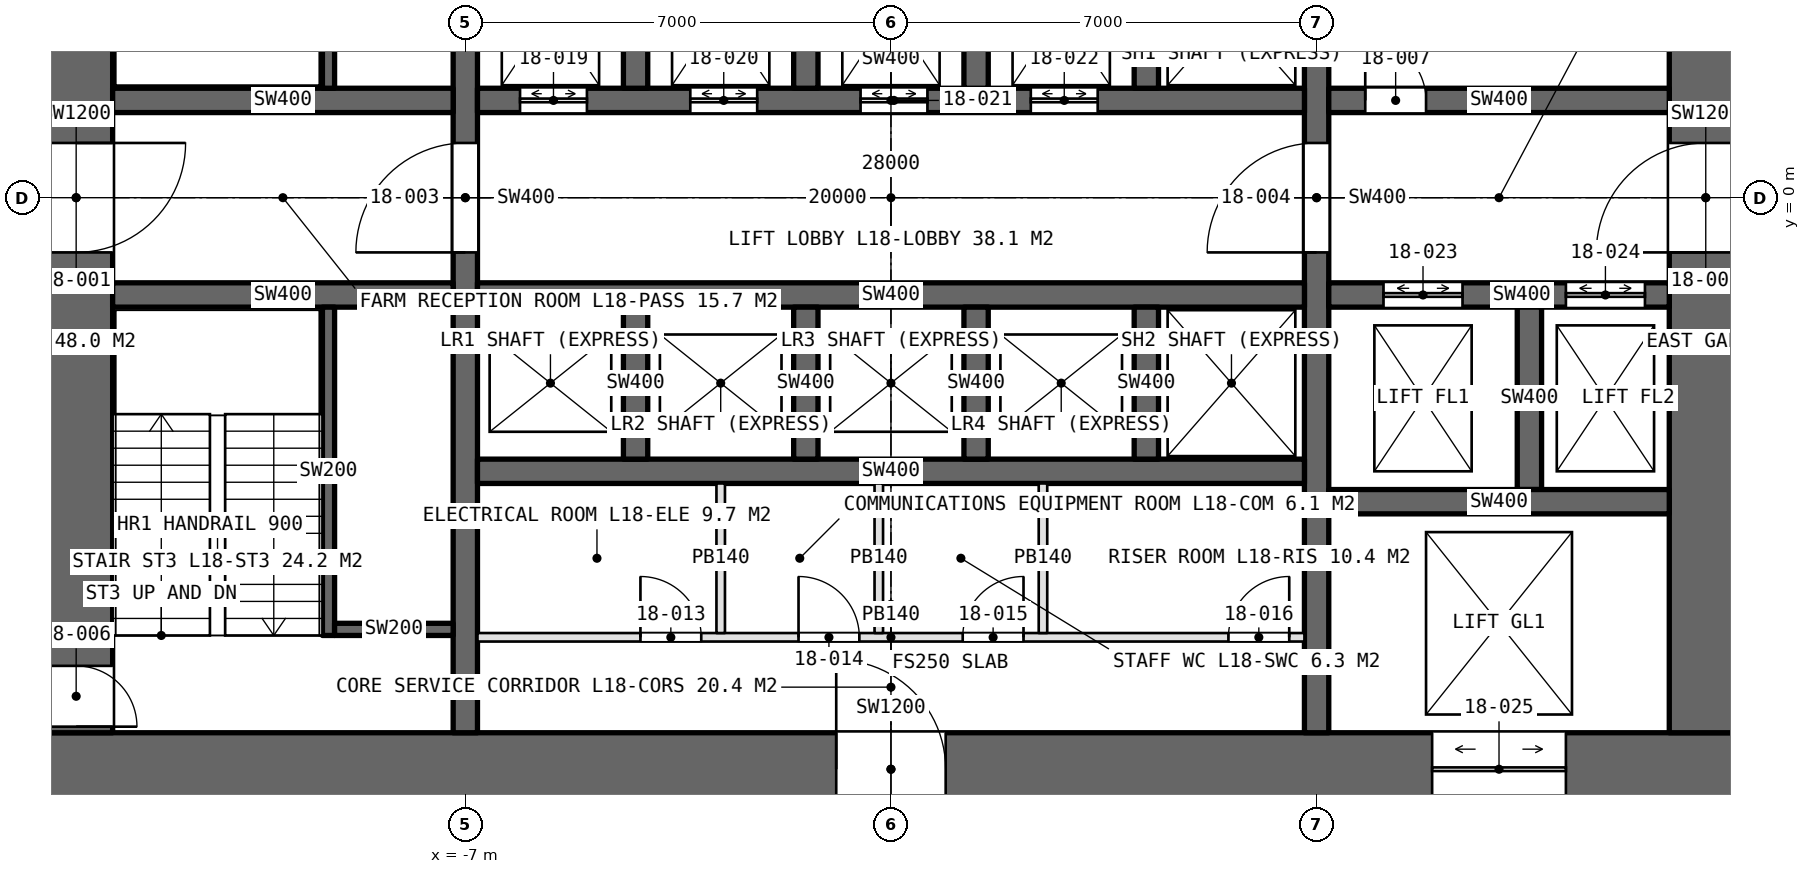
"""IFC4 building model, lengths in metres.
Left out: names, types, materials, properties, quantities, classifications, styles, units other than length and angle.
Written with IfcOpenShell. Run it as: python <this file> out.ifc"""

import sys

from ifc_helpers import new_model, si_unit, direction, frame, frame_2d, origin, place, context, subcontext, project, spatial, rectangle, extrude, element, fill, save


model = new_model("IFC4")
c1 = context("Model", 3, precision=1e-05, world=origin(), true_north=direction((0.0, 1.0)))
c2 = subcontext(c1, "Body", "Model", "MODEL_VIEW")
j1 = project(units=[si_unit("LENGTHUNIT", "METRE"), si_unit("PLANEANGLEUNIT", "RADIAN")], contexts=[c1])
p1 = place(None, origin())
s1 = spatial("IfcSite", under=j1, at=p1, CompositionType="ELEMENT")
p2 = place(p1, origin())
s2 = spatial("IfcBuilding", under=s1, at=p2, CompositionType="ELEMENT")
p3 = place(p2, frame((0.0, 0.0, 90.0)))
s3 = spatial("IfcBuildingStorey", under=s2, at=p3, CompositionType="ELEMENT", Elevation=90.0)
p4 = place(p3, frame((-14.0, -9.4, 0.0), z_axis=(0.0, 0.0, 1.0), x_axis=(1.0, 0.0, 0.0)))
e1 = element("IfcWall", 1, at=p4, inside=s3, PredefinedType="SHEAR", context=c2, shape_type="SweptSolid", body=[
    extrude(rectangle(XDim=28.0, YDim=1.2, at=frame_2d((14.0, 0.0))), origin(), (0.0, 0.0, 1.0), 5.0),
])
p5 = place(p4, frame((13.1, 0.0, 0.0)))
e2 = element("IfcOpeningElement", 2, at=p5, cuts=e1, PredefinedType="OPENING", context=c2, shape_type="SweptSolid", body=[
    extrude(rectangle(XDim=1.8, YDim=2.4, at=frame_2d((0.9, 1.2))), frame((0.0, 0.61, 0.0), z_axis=(0.0, -1.0, 0.0), x_axis=(1.0, 0.0, 0.0)), (0.0, 0.0, 1.0), 1.22),
])
p6 = place(p4, frame((22.9, 0.0, 0.0)))
e3 = element("IfcOpeningElement", 3, at=p6, cuts=e1, PredefinedType="OPENING", context=c2, shape_type="SweptSolid", body=[
    extrude(rectangle(XDim=2.2, YDim=2.7, at=frame_2d((1.1, 1.35))), frame((0.0, 0.61, 0.0), z_axis=(0.0, -1.0, 0.0), x_axis=(1.0, 0.0, 0.0)), (0.0, 0.0, 1.0), 1.22),
])
p7 = place(p3, frame((-13.4, 8.8, 0.0), z_axis=(0.0, 0.0, 1.0), x_axis=(0.0, -1.0, 0.0)))
e4 = element("IfcWall", 4, at=p7, inside=s3, PredefinedType="SHEAR", context=c2, shape_type="SweptSolid", body=[
    extrude(rectangle(XDim=17.6, YDim=1.2, at=frame_2d((8.8, 0.0))), origin(), (0.0, 0.0, 1.0), 5.0),
])
p8 = place(p7, frame((7.9, 0.0, 0.0)))
e5 = element("IfcOpeningElement", 5, at=p8, cuts=e4, PredefinedType="OPENING", context=c2, shape_type="SweptSolid", body=[
    extrude(rectangle(XDim=1.8, YDim=2.4, at=frame_2d((0.9, 1.2))), frame((0.0, 0.61, 0.0), z_axis=(0.0, -1.0, 0.0), x_axis=(1.0, 0.0, 0.0)), (0.0, 0.0, 1.0), 1.22),
])
p9 = place(p7, frame((16.5, 0.0, 0.0)))
e6 = element("IfcOpeningElement", 6, at=p9, cuts=e4, PredefinedType="OPENING", context=c2, shape_type="SweptSolid", body=[
    extrude(rectangle(XDim=1.0, YDim=2.4, at=frame_2d((0.5, 1.2))), frame((0.0, 0.61, 0.0), z_axis=(0.0, -1.0, 0.0), x_axis=(1.0, 0.0, 0.0)), (0.0, 0.0, 1.0), 1.22),
])
p10 = place(p3, frame((13.4, -8.8, 0.0), z_axis=(0.0, 0.0, 1.0), x_axis=(0.0, 1.0, 0.0)))
e7 = element("IfcWall", 7, at=p10, inside=s3, PredefinedType="SHEAR", context=c2, shape_type="SweptSolid", body=[
    extrude(rectangle(XDim=17.6, YDim=1.2, at=frame_2d((8.8, 0.0))), origin(), (0.0, 0.0, 1.0), 5.0),
])
p11 = place(p10, frame((7.9, 0.0, 0.0)))
e8 = element("IfcOpeningElement", 8, at=p11, cuts=e7, PredefinedType="OPENING", context=c2, shape_type="SweptSolid", body=[
    extrude(rectangle(XDim=1.8, YDim=2.4, at=frame_2d((0.9, 1.2))), frame((0.0, 0.61, 0.0), z_axis=(0.0, -1.0, 0.0), x_axis=(1.0, 0.0, 0.0)), (0.0, 0.0, 1.0), 1.22),
])
p12 = place(p3, frame((-7.0, -8.8, 0.0), z_axis=(0.0, 0.0, 1.0), x_axis=(0.0, 1.0, 0.0)))
e9 = element("IfcWall", 9, at=p12, inside=s3, PredefinedType="SHEAR", context=c2, shape_type="SweptSolid", body=[
    extrude(rectangle(XDim=17.6, YDim=0.4, at=frame_2d((8.8, 0.0))), origin(), (0.0, 0.0, 1.0), 5.0),
])
p13 = place(p12, frame((7.9, 0.0, 0.0)))
e10 = element("IfcOpeningElement", 10, at=p13, cuts=e9, PredefinedType="OPENING", context=c2, shape_type="SweptSolid", body=[
    extrude(rectangle(XDim=1.8, YDim=2.4, at=frame_2d((0.9, 1.2))), frame((0.0, 0.21, 0.0), z_axis=(0.0, -1.0, 0.0), x_axis=(1.0, 0.0, 0.0)), (0.0, 0.0, 1.0), 0.42),
])
p14 = place(p3, frame((7.0, -8.8, 0.0), z_axis=(0.0, 0.0, 1.0), x_axis=(0.0, 1.0, 0.0)))
e11 = element("IfcWall", 11, at=p14, inside=s3, PredefinedType="SHEAR", context=c2, shape_type="SweptSolid", body=[
    extrude(rectangle(XDim=17.6, YDim=0.4, at=frame_2d((8.8, 0.0))), origin(), (0.0, 0.0, 1.0), 5.0),
])
p15 = place(p14, frame((7.9, 0.0, 0.0)))
e12 = element("IfcOpeningElement", 12, at=p15, cuts=e11, PredefinedType="OPENING", context=c2, shape_type="SweptSolid", body=[
    extrude(rectangle(XDim=1.8, YDim=2.4, at=frame_2d((0.9, 1.2))), frame((0.0, 0.21, 0.0), z_axis=(0.0, -1.0, 0.0), x_axis=(1.0, 0.0, 0.0)), (0.0, 0.0, 1.0), 0.42),
])
p16 = place(p3, frame((-6.8, 1.6, 0.0), z_axis=(0.0, 0.0, 1.0), x_axis=(1.0, 0.0, 0.0)))
e13 = element("IfcWall", 13, at=p16, inside=s3, PredefinedType="SHEAR", context=c2, shape_type="SweptSolid", body=[
    extrude(rectangle(XDim=13.6, YDim=0.4, at=frame_2d((6.8, 0.0))), origin(), (0.0, 0.0, 1.0), 5.0),
])
p17 = place(p16, frame((0.7, 0.0, 0.0)))
e14 = element("IfcOpeningElement", 14, at=p17, cuts=e13, PredefinedType="OPENING", context=c2, shape_type="SweptSolid", body=[
    extrude(rectangle(XDim=1.1, YDim=2.4, at=frame_2d((0.55, 1.2))), frame((0.0, 0.21, 0.0), z_axis=(0.0, -1.0, 0.0), x_axis=(1.0, 0.0, 0.0)), (0.0, 0.0, 1.0), 0.42),
])
p18 = place(p16, frame((3.5, 0.0, 0.0)))
e15 = element("IfcOpeningElement", 15, at=p18, cuts=e13, PredefinedType="OPENING", context=c2, shape_type="SweptSolid", body=[
    extrude(rectangle(XDim=1.1, YDim=2.4, at=frame_2d((0.55, 1.2))), frame((0.0, 0.21, 0.0), z_axis=(0.0, -1.0, 0.0), x_axis=(1.0, 0.0, 0.0)), (0.0, 0.0, 1.0), 0.42),
])
p19 = place(p16, frame((6.3, 0.0, 0.0)))
e16 = element("IfcOpeningElement", 16, at=p19, cuts=e13, PredefinedType="OPENING", context=c2, shape_type="SweptSolid", body=[
    extrude(rectangle(XDim=1.1, YDim=2.4, at=frame_2d((0.55, 1.2))), frame((0.0, 0.21, 0.0), z_axis=(0.0, -1.0, 0.0), x_axis=(1.0, 0.0, 0.0)), (0.0, 0.0, 1.0), 0.42),
])
p20 = place(p16, frame((9.1, 0.0, 0.0)))
e17 = element("IfcOpeningElement", 17, at=p20, cuts=e13, PredefinedType="OPENING", context=c2, shape_type="SweptSolid", body=[
    extrude(rectangle(XDim=1.1, YDim=2.4, at=frame_2d((0.55, 1.2))), frame((0.0, 0.21, 0.0), z_axis=(0.0, -1.0, 0.0), x_axis=(1.0, 0.0, 0.0)), (0.0, 0.0, 1.0), 0.42),
])
for number, where, z_axis, x_axis in (
    (18, (-6.8, -1.6, 0.0), (0.0, 0.0, 1.0), (1.0, 0.0, 0.0)),
    (19, (-6.8, -4.5, 0.0), (0.0, 0.0, 1.0), (1.0, 0.0, 0.0)),
):
    element("IfcWall", number, at=place(p3, frame(where, z_axis=z_axis, x_axis=x_axis)), inside=s3, PredefinedType="SHEAR", context=c2, shape_type="SweptSolid", body=[
        extrude(rectangle(XDim=13.6, YDim=0.4, at=frame_2d((6.8, 0.0))), origin(), (0.0, 0.0, 1.0), 5.0),
    ])
for number, where, z_axis, x_axis in (
    (20, (-12.8, 1.6, 0.0), (0.0, 0.0, 1.0), (1.0, 0.0, 0.0)),
    (21, (-12.8, -1.6, 0.0), (0.0, 0.0, 1.0), (1.0, 0.0, 0.0)),
):
    element("IfcWall", number, at=place(p3, frame(where, z_axis=z_axis, x_axis=x_axis)), inside=s3, PredefinedType="SHEAR", context=c2, shape_type="SweptSolid", body=[
        extrude(rectangle(XDim=5.6, YDim=0.4, at=frame_2d((2.8, 0.0))), origin(), (0.0, 0.0, 1.0), 5.0),
    ])
p21 = place(p3, frame((7.2, 1.6, 0.0), z_axis=(0.0, 0.0, 1.0), x_axis=(1.0, 0.0, 0.0)))
e22 = element("IfcWall", 22, at=p21, inside=s3, PredefinedType="SHEAR", context=c2, shape_type="SweptSolid", body=[
    extrude(rectangle(XDim=5.6, YDim=0.4, at=frame_2d((2.8, 0.0))), origin(), (0.0, 0.0, 1.0), 5.0),
])
p22 = place(p21, frame((0.6, 0.0, 0.0)))
e23 = element("IfcOpeningElement", 23, at=p22, cuts=e22, PredefinedType="OPENING", context=c2, shape_type="SweptSolid", body=[
    extrude(rectangle(XDim=1.0, YDim=2.4, at=frame_2d((0.5, 1.2))), frame((0.0, 0.21, 0.0), z_axis=(0.0, -1.0, 0.0), x_axis=(1.0, 0.0, 0.0)), (0.0, 0.0, 1.0), 0.42),
])
p23 = place(p3, frame((7.2, -1.6, 0.0), z_axis=(0.0, 0.0, 1.0), x_axis=(1.0, 0.0, 0.0)))
e24 = element("IfcWall", 24, at=p23, inside=s3, PredefinedType="SHEAR", context=c2, shape_type="SweptSolid", body=[
    extrude(rectangle(XDim=5.6, YDim=0.4, at=frame_2d((2.8, 0.0))), origin(), (0.0, 0.0, 1.0), 5.0),
])
p24 = place(p23, frame((0.9, 0.0, 0.0)))
e25 = element("IfcOpeningElement", 25, at=p24, cuts=e24, PredefinedType="OPENING", context=c2, shape_type="SweptSolid", body=[
    extrude(rectangle(XDim=1.3, YDim=2.4, at=frame_2d((0.65, 1.2))), frame((0.0, 0.21, 0.0), z_axis=(0.0, -1.0, 0.0), x_axis=(1.0, 0.0, 0.0)), (0.0, 0.0, 1.0), 0.42),
])
p25 = place(p23, frame((3.9, 0.0, 0.0)))
e26 = element("IfcOpeningElement", 26, at=p25, cuts=e24, PredefinedType="OPENING", context=c2, shape_type="SweptSolid", body=[
    extrude(rectangle(XDim=1.3, YDim=2.4, at=frame_2d((0.65, 1.2))), frame((0.0, 0.21, 0.0), z_axis=(0.0, -1.0, 0.0), x_axis=(1.0, 0.0, 0.0)), (0.0, 0.0, 1.0), 0.42),
])
p26 = place(p3, frame((10.5, -4.8, 0.0), z_axis=(0.0, 0.0, 1.0), x_axis=(0.0, 1.0, 0.0)))
e27 = element("IfcWall", 27, at=p26, inside=s3, PredefinedType="SHEAR", context=c2, shape_type="SweptSolid", body=[
    extrude(rectangle(XDim=3.0, YDim=0.4, at=frame_2d((1.5, 0.0))), origin(), (0.0, 0.0, 1.0), 5.0),
])
p27 = place(p3, frame((7.2, -5.0, 0.0), z_axis=(0.0, 0.0, 1.0), x_axis=(1.0, 0.0, 0.0)))
e28 = element("IfcWall", 28, at=p27, inside=s3, PredefinedType="SHEAR", context=c2, shape_type="SweptSolid", body=[
    extrude(rectangle(XDim=5.6, YDim=0.4, at=frame_2d((2.8, 0.0))), origin(), (0.0, 0.0, 1.0), 5.0),
])
for number, where, z_axis, x_axis in (
    (29, (-4.2, 1.8, 0.0), (0.0, 0.0, 1.0), (0.0, 1.0, 0.0)),
    (30, (-4.2, -4.3, 0.0), (0.0, 0.0, 1.0), (0.0, 1.0, 0.0)),
    (31, (-1.4, 1.8, 0.0), (0.0, 0.0, 1.0), (0.0, 1.0, 0.0)),
    (32, (-1.4, -4.3, 0.0), (0.0, 0.0, 1.0), (0.0, 1.0, 0.0)),
    (33, (1.4, 1.8, 0.0), (0.0, 0.0, 1.0), (0.0, 1.0, 0.0)),
    (34, (1.4, -4.3, 0.0), (0.0, 0.0, 1.0), (0.0, 1.0, 0.0)),
    (35, (4.2, 1.8, 0.0), (0.0, 0.0, 1.0), (0.0, 1.0, 0.0)),
    (36, (4.2, -4.3, 0.0), (0.0, 0.0, 1.0), (0.0, 1.0, 0.0)),
):
    element("IfcWall", number, at=place(p3, frame(where, z_axis=z_axis, x_axis=x_axis)), inside=s3, PredefinedType="SHEAR", context=c2, shape_type="SweptSolid", body=[
        extrude(rectangle(XDim=2.5, YDim=0.4, at=frame_2d((1.25, 0.0))), origin(), (0.0, 0.0, 1.0), 5.0),
    ])
p28 = place(p3, frame((-6.8, -7.23, 0.0), z_axis=(0.0, 0.0, 1.0), x_axis=(1.0, 0.0, 0.0)))
e37 = element("IfcWall", 37, at=p28, inside=s3, PredefinedType="PARTITIONING", context=c2, shape_type="SweptSolid", body=[
    extrude(rectangle(XDim=13.6, YDim=0.14, at=frame_2d((6.8, 0.0))), origin(), (0.0, 0.0, 1.0), 4.75),
])
p29 = place(p28, frame((2.68, 0.0, 0.0)))
e38 = element("IfcOpeningElement", 38, at=p29, cuts=e37, PredefinedType="OPENING", context=c2, shape_type="SweptSolid", body=[
    extrude(rectangle(XDim=1.0, YDim=2.4, at=frame_2d((0.5, 1.2))), frame((0.0, 0.08, 0.0), z_axis=(0.0, -1.0, 0.0), x_axis=(1.0, 0.0, 0.0)), (0.0, 0.0, 1.0), 0.16),
])
p30 = place(p28, frame((5.28, 0.0, 0.0)))
e39 = element("IfcOpeningElement", 39, at=p30, cuts=e37, PredefinedType="OPENING", context=c2, shape_type="SweptSolid", body=[
    extrude(rectangle(XDim=1.0, YDim=2.4, at=frame_2d((0.5, 1.2))), frame((0.0, 0.08, 0.0), z_axis=(0.0, -1.0, 0.0), x_axis=(1.0, 0.0, 0.0)), (0.0, 0.0, 1.0), 0.16),
])
p31 = place(p28, frame((7.98, 0.0, 0.0)))
e40 = element("IfcOpeningElement", 40, at=p31, cuts=e37, PredefinedType="OPENING", context=c2, shape_type="SweptSolid", body=[
    extrude(rectangle(XDim=1.0, YDim=2.4, at=frame_2d((0.5, 1.2))), frame((0.0, 0.08, 0.0), z_axis=(0.0, -1.0, 0.0), x_axis=(1.0, 0.0, 0.0)), (0.0, 0.0, 1.0), 0.16),
])
p32 = place(p28, frame((12.35, 0.0, 0.0)))
e41 = element("IfcOpeningElement", 41, at=p32, cuts=e37, PredefinedType="OPENING", context=c2, shape_type="SweptSolid", body=[
    extrude(rectangle(XDim=1.0, YDim=2.4, at=frame_2d((0.5, 1.2))), frame((0.0, 0.08, 0.0), z_axis=(0.0, -1.0, 0.0), x_axis=(1.0, 0.0, 0.0)), (0.0, 0.0, 1.0), 0.16),
])
for number, where, z_axis, x_axis in (
    (42, (-2.8, -4.7, 0.0), (0.0, 0.0, 1.0), (0.0, -1.0, 0.0)),
    (43, (-0.2, -4.7, 0.0), (0.0, 0.0, 1.0), (0.0, -1.0, 0.0)),
    (44, (2.5, -4.7, 0.0), (0.0, 0.0, 1.0), (0.0, -1.0, 0.0)),
):
    element("IfcWall", number, at=place(p3, frame(where, z_axis=z_axis, x_axis=x_axis)), inside=s3, PredefinedType="PARTITIONING", context=c2, shape_type="SweptSolid", body=[
        extrude(rectangle(XDim=2.46, YDim=0.14, at=frame_2d((1.23, 0.0))), origin(), (0.0, 0.0, 1.0), 4.75),
    ])
for number, where, z_axis, x_axis in (
    (45, (-9.25, 7.2, 0.0), (0.0, 0.0, 1.0), (0.0, -1.0, 0.0)),
    (46, (-9.25, -7.2, 0.0), (0.0, 0.0, 1.0), (0.0, 1.0, 0.0)),
):
    element("IfcWall", number, at=place(p3, frame(where, z_axis=z_axis, x_axis=x_axis)), inside=s3, PredefinedType="SOLIDWALL", context=c2, shape_type="SweptSolid", body=[
        extrude(rectangle(XDim=5.4, YDim=0.2, at=frame_2d((2.7, 0.0))), origin(), (0.0, 0.0, 1.0), 5.0),
    ])
p33 = place(p3, frame((-9.15, -7.1, 0.0), z_axis=(0.0, 0.0, 1.0), x_axis=(1.0, 0.0, 0.0)))
e47 = element("IfcWall", 47, at=p33, inside=s3, PredefinedType="SOLIDWALL", context=c2, shape_type="SweptSolid", body=[
    extrude(rectangle(XDim=1.95, YDim=0.2, at=frame_2d((0.975, 0.0))), origin(), (0.0, 0.0, 1.0), 5.0),
])
p34 = place(p8, origin())
e48 = element("IfcDoor", 48, at=p34, inside=s3, OperationType="DOUBLE_DOOR_SINGLE_SWING", PredefinedType="DOOR", context=c2, shape_type="SweptSolid", body=[
    extrude(rectangle(XDim=1.8, YDim=2.4, at=frame_2d((0.9, 1.2))), frame((0.0, 0.025, 0.0), z_axis=(0.0, -1.0, 0.0), x_axis=(1.0, 0.0, 0.0)), (0.0, 0.0, 1.0), 0.05),
])
fill(e5, e48)
p35 = place(p11, origin())
e49 = element("IfcDoor", 49, at=p35, inside=s3, OperationType="DOUBLE_DOOR_SINGLE_SWING", PredefinedType="DOOR", context=c2, shape_type="SweptSolid", body=[
    extrude(rectangle(XDim=1.8, YDim=2.4, at=frame_2d((0.9, 1.2))), frame((0.0, 0.025, 0.0), z_axis=(0.0, -1.0, 0.0), x_axis=(1.0, 0.0, 0.0)), (0.0, 0.0, 1.0), 0.05),
])
fill(e8, e49)
p36 = place(p13, origin())
e50 = element("IfcDoor", 50, at=p36, inside=s3, OperationType="DOUBLE_DOOR_SINGLE_SWING", PredefinedType="DOOR", context=c2, shape_type="SweptSolid", body=[
    extrude(rectangle(XDim=1.8, YDim=2.4, at=frame_2d((0.9, 1.2))), frame((0.0, 0.025, 0.0), z_axis=(0.0, -1.0, 0.0), x_axis=(1.0, 0.0, 0.0)), (0.0, 0.0, 1.0), 0.05),
])
fill(e10, e50)
p37 = place(p15, origin())
e51 = element("IfcDoor", 51, at=p37, inside=s3, OperationType="DOUBLE_DOOR_SINGLE_SWING", PredefinedType="DOOR", context=c2, shape_type="SweptSolid", body=[
    extrude(rectangle(XDim=1.8, YDim=2.4, at=frame_2d((0.9, 1.2))), frame((0.0, 0.025, 0.0), z_axis=(0.0, -1.0, 0.0), x_axis=(1.0, 0.0, 0.0)), (0.0, 0.0, 1.0), 0.05),
])
fill(e12, e51)
p38 = place(p9, origin())
e52 = element("IfcDoor", 52, at=p38, inside=s3, OperationType="SINGLE_SWING_RIGHT", PredefinedType="DOOR", context=c2, shape_type="SweptSolid", body=[
    extrude(rectangle(XDim=1.0, YDim=2.4, at=frame_2d((0.5, 1.2))), frame((0.0, 0.025, 0.0), z_axis=(0.0, -1.0, 0.0), x_axis=(1.0, 0.0, 0.0)), (0.0, 0.0, 1.0), 0.05),
])
fill(e6, e52)
p39 = place(p22, origin())
e53 = element("IfcDoor", 53, at=p39, inside=s3, OperationType="SINGLE_SWING_LEFT", PredefinedType="DOOR", context=c2, shape_type="SweptSolid", body=[
    extrude(rectangle(XDim=1.0, YDim=2.4, at=frame_2d((0.5, 1.2))), frame((0.0, 0.025, 0.0), z_axis=(0.0, -1.0, 0.0), x_axis=(1.0, 0.0, 0.0)), (0.0, 0.0, 1.0), 0.05),
])
fill(e23, e53)
p40 = place(p29, origin())
e54 = element("IfcDoor", 54, at=p40, inside=s3, OperationType="SINGLE_SWING_LEFT", PredefinedType="DOOR", context=c2, shape_type="SweptSolid", body=[
    extrude(rectangle(XDim=1.0, YDim=2.4, at=frame_2d((0.5, 1.2))), frame((0.0, 0.025, 0.0), z_axis=(0.0, -1.0, 0.0), x_axis=(1.0, 0.0, 0.0)), (0.0, 0.0, 1.0), 0.05),
])
fill(e38, e54)
p41 = place(p30, origin())
e55 = element("IfcDoor", 55, at=p41, inside=s3, OperationType="SINGLE_SWING_LEFT", PredefinedType="DOOR", context=c2, shape_type="SweptSolid", body=[
    extrude(rectangle(XDim=1.0, YDim=2.4, at=frame_2d((0.5, 1.2))), frame((0.0, 0.025, 0.0), z_axis=(0.0, -1.0, 0.0), x_axis=(1.0, 0.0, 0.0)), (0.0, 0.0, 1.0), 0.05),
])
fill(e39, e55)
p42 = place(p31, origin())
e56 = element("IfcDoor", 56, at=p42, inside=s3, OperationType="SINGLE_SWING_RIGHT", PredefinedType="DOOR", context=c2, shape_type="SweptSolid", body=[
    extrude(rectangle(XDim=1.0, YDim=2.4, at=frame_2d((0.5, 1.2))), frame((0.0, 0.025, 0.0), z_axis=(0.0, -1.0, 0.0), x_axis=(1.0, 0.0, 0.0)), (0.0, 0.0, 1.0), 0.05),
])
fill(e40, e56)
p43 = place(p32, origin())
e57 = element("IfcDoor", 57, at=p43, inside=s3, OperationType="SINGLE_SWING_RIGHT", PredefinedType="DOOR", context=c2, shape_type="SweptSolid", body=[
    extrude(rectangle(XDim=1.0, YDim=2.4, at=frame_2d((0.5, 1.2))), frame((0.0, 0.025, 0.0), z_axis=(0.0, -1.0, 0.0), x_axis=(1.0, 0.0, 0.0)), (0.0, 0.0, 1.0), 0.05),
])
fill(e41, e57)
p44 = place(p5, origin())
e58 = element("IfcDoor", 58, at=p44, inside=s3, OperationType="DOUBLE_DOOR_SINGLE_SWING", PredefinedType="DOOR", context=c2, shape_type="SweptSolid", body=[
    extrude(rectangle(XDim=1.8, YDim=2.4, at=frame_2d((0.9, 1.2))), frame((0.0, 0.025, 0.0), z_axis=(0.0, -1.0, 0.0), x_axis=(1.0, 0.0, 0.0)), (0.0, 0.0, 1.0), 0.05),
])
fill(e2, e58)
p45 = place(p17, origin())
e59 = element("IfcDoor", 59, at=p45, inside=s3, OperationType="DOUBLE_DOOR_SLIDING", PredefinedType="DOOR", context=c2, shape_type="SweptSolid", body=[
    extrude(rectangle(XDim=1.1, YDim=2.4, at=frame_2d((0.55, 1.2))), frame((0.0, 0.025, 0.0), z_axis=(0.0, -1.0, 0.0), x_axis=(1.0, 0.0, 0.0)), (0.0, 0.0, 1.0), 0.05),
])
fill(e14, e59)
p46 = place(p18, origin())
e60 = element("IfcDoor", 60, at=p46, inside=s3, OperationType="DOUBLE_DOOR_SLIDING", PredefinedType="DOOR", context=c2, shape_type="SweptSolid", body=[
    extrude(rectangle(XDim=1.1, YDim=2.4, at=frame_2d((0.55, 1.2))), frame((0.0, 0.025, 0.0), z_axis=(0.0, -1.0, 0.0), x_axis=(1.0, 0.0, 0.0)), (0.0, 0.0, 1.0), 0.05),
])
fill(e15, e60)
p47 = place(p19, origin())
e61 = element("IfcDoor", 61, at=p47, inside=s3, OperationType="DOUBLE_DOOR_SLIDING", PredefinedType="DOOR", context=c2, shape_type="SweptSolid", body=[
    extrude(rectangle(XDim=1.1, YDim=2.4, at=frame_2d((0.55, 1.2))), frame((0.0, 0.025, 0.0), z_axis=(0.0, -1.0, 0.0), x_axis=(1.0, 0.0, 0.0)), (0.0, 0.0, 1.0), 0.05),
])
fill(e16, e61)
p48 = place(p20, origin())
e62 = element("IfcDoor", 62, at=p48, inside=s3, OperationType="DOUBLE_DOOR_SLIDING", PredefinedType="DOOR", context=c2, shape_type="SweptSolid", body=[
    extrude(rectangle(XDim=1.1, YDim=2.4, at=frame_2d((0.55, 1.2))), frame((0.0, 0.025, 0.0), z_axis=(0.0, -1.0, 0.0), x_axis=(1.0, 0.0, 0.0)), (0.0, 0.0, 1.0), 0.05),
])
fill(e17, e62)
p49 = place(p24, origin())
e63 = element("IfcDoor", 63, at=p49, inside=s3, OperationType="DOUBLE_DOOR_SLIDING", PredefinedType="DOOR", context=c2, shape_type="SweptSolid", body=[
    extrude(rectangle(XDim=1.3, YDim=2.4, at=frame_2d((0.65, 1.2))), frame((0.0, 0.025, 0.0), z_axis=(0.0, -1.0, 0.0), x_axis=(1.0, 0.0, 0.0)), (0.0, 0.0, 1.0), 0.05),
])
fill(e25, e63)
p50 = place(p25, origin())
e64 = element("IfcDoor", 64, at=p50, inside=s3, OperationType="DOUBLE_DOOR_SLIDING", PredefinedType="DOOR", context=c2, shape_type="SweptSolid", body=[
    extrude(rectangle(XDim=1.3, YDim=2.4, at=frame_2d((0.65, 1.2))), frame((0.0, 0.025, 0.0), z_axis=(0.0, -1.0, 0.0), x_axis=(1.0, 0.0, 0.0)), (0.0, 0.0, 1.0), 0.05),
])
fill(e26, e64)
p51 = place(p6, origin())
e65 = element("IfcDoor", 65, at=p51, inside=s3, OperationType="DOUBLE_DOOR_SLIDING", PredefinedType="DOOR", context=c2, shape_type="SweptSolid", body=[
    extrude(rectangle(XDim=2.2, YDim=2.7, at=frame_2d((1.1, 1.35))), frame((0.0, 0.025, 0.0), z_axis=(0.0, -1.0, 0.0), x_axis=(1.0, 0.0, 0.0)), (0.0, 0.0, 1.0), 0.05),
])
fill(e3, e65)
save(model, sys.argv[1])
